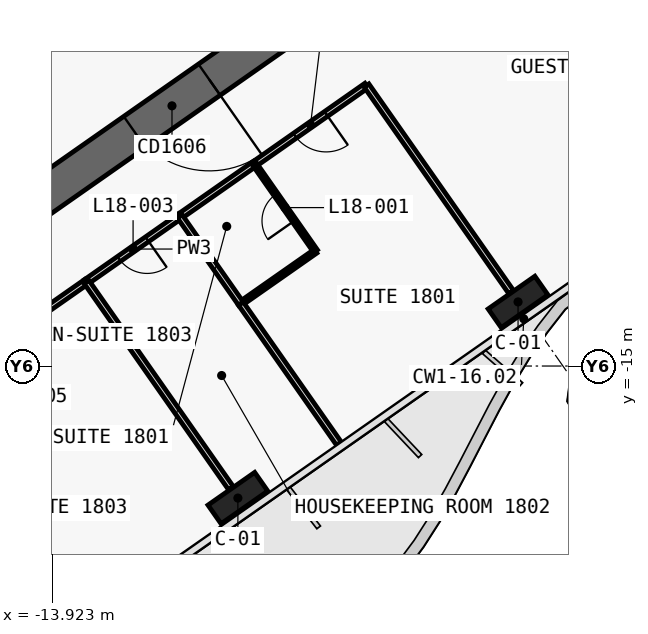
"""IFC4 building model, lengths in metres.
Left out: names, types, materials, properties, quantities, classifications, styles, units other than length and angle.
Written with IfcOpenShell. Run it as: python <this file> out.ifc"""

import sys

from ifc_helpers import new_model, si_unit, direction, frame, frame_2d, origin, origin_2d, place, context, subcontext, project, spatial, polyline, rectangle, outline, extrude, element, fill, save


model = new_model("IFC4")
c1 = context("Model", 3, precision=1e-05, world=origin(), true_north=direction((0.0, 1.0)))
c2 = subcontext(c1, "Body", "Model", "MODEL_VIEW")
j1 = project(units=[si_unit("LENGTHUNIT", "METRE"), si_unit("PLANEANGLEUNIT", "RADIAN")], contexts=[c1])
p1 = place(None, origin())
s1 = spatial("IfcSite", under=j1, at=p1, CompositionType="ELEMENT")
p2 = place(p1, origin())
s2 = spatial("IfcBuilding", under=s1, at=p2, CompositionType="ELEMENT")
p3 = place(p2, frame((0.0, 0.0, 90.5)))
s3 = spatial("IfcBuildingStorey", under=s2, at=p3, CompositionType="ELEMENT", Elevation=90.5)
p4 = place(p3, frame((0.037, 11.867, 0.0), z_axis=(0.0, 0.0, 1.0), x_axis=(-0.819155306259, -0.573571777746, 0.0)))
e1 = element("IfcWall", 1, at=p4, inside=s3, PredefinedType="SHEAR", context=c2, shape_type="SweptSolid", body=[
    extrude(outline(polyline([(33.837, 0.5), (0.7, 0.5), (0.0, -0.5), (33.837, -0.5), (33.837, 0.5)])), origin(), (0.0, 0.0, 1.0), 3.6),
])
p5 = place(p3, frame((0.037, -0.585, 0.0), z_axis=(0.0, 0.0, 1.0), x_axis=(-0.819157152511, -0.573569140985, 0.0)))
e2 = element("IfcWall", 2, at=p5, inside=s3, PredefinedType="SHEAR", context=c2, shape_type="SweptSolid", body=[
    extrude(outline(polyline([(26.695, 0.5), (0.7, 0.5), (0.0, -0.5), (26.695, -0.5), (26.695, 0.5)])), origin(), (0.0, 0.0, 1.0), 3.6),
])
p6 = place(p5, frame((2.995, 0.0, 0.0)))
e3 = element("IfcOpeningElement", 3, at=p6, cuts=e2, PredefinedType="OPENING", context=c2, shape_type="SweptSolid", body=[
    extrude(rectangle(XDim=2.4, YDim=2.1, at=frame_2d((1.2, 1.05))), frame((0.0, 0.51, 0.0), z_axis=(0.0, -1.0, 0.0), x_axis=(1.0, 0.0, 0.0)), (0.0, 0.0, 1.0), 1.02),
])
p7 = place(p5, frame((11.995, 0.0, 0.0)))
e4 = element("IfcOpeningElement", 4, at=p7, cuts=e2, PredefinedType="OPENING", context=c2, shape_type="SweptSolid", body=[
    extrude(rectangle(XDim=2.4, YDim=2.1, at=frame_2d((1.2, 1.05))), frame((0.0, 0.51, 0.0), z_axis=(0.0, -1.0, 0.0), x_axis=(1.0, 0.0, 0.0)), (0.0, 0.0, 1.0), 1.02),
])
p8 = place(p3, frame((-2.638, 3.768, 0.0), z_axis=(0.0, 0.0, 1.0), x_axis=(-0.819148977158, -0.573580816643, 0.0)))
e5 = element("IfcWall", 5, at=p8, inside=s3, PredefinedType="SHEAR", context=c2, shape_type="SweptSolid", body=[
    extrude(outline(polyline([(26.0, 0.25), (0.0, 0.25), (0.0, -0.25), (26.0, -0.25), (26.0, 0.25)])), origin(), (0.0, 0.0, 1.0), 3.6),
])
p9 = place(p8, frame((1.169, 0.0, 0.0)))
e6 = element("IfcOpeningElement", 6, at=p9, cuts=e5, PredefinedType="OPENING", context=c2, shape_type="SweptSolid", body=[
    extrude(rectangle(XDim=1.1, YDim=2.1, at=frame_2d((0.55, 1.05))), frame((0.0, 0.26, 0.0), z_axis=(0.0, -1.0, 0.0), x_axis=(1.0, 0.0, 0.0)), (0.0, 0.0, 1.0), 0.52),
])
p10 = place(p8, frame((3.206, 0.0, 0.0)))
e7 = element("IfcOpeningElement", 7, at=p10, cuts=e5, PredefinedType="OPENING", context=c2, shape_type="SweptSolid", body=[
    extrude(rectangle(XDim=1.1, YDim=2.1, at=frame_2d((0.55, 1.05))), frame((0.0, 0.26, 0.0), z_axis=(0.0, -1.0, 0.0), x_axis=(1.0, 0.0, 0.0)), (0.0, 0.0, 1.0), 0.52),
])
p11 = place(p8, frame((5.244, 0.0, 0.0)))
e8 = element("IfcOpeningElement", 8, at=p11, cuts=e5, PredefinedType="OPENING", context=c2, shape_type="SweptSolid", body=[
    extrude(rectangle(XDim=1.1, YDim=2.1, at=frame_2d((0.55, 1.05))), frame((0.0, 0.26, 0.0), z_axis=(0.0, -1.0, 0.0), x_axis=(1.0, 0.0, 0.0)), (0.0, 0.0, 1.0), 0.52),
])
p12 = place(p8, frame((7.281, 0.0, 0.0)))
e9 = element("IfcOpeningElement", 9, at=p12, cuts=e5, PredefinedType="OPENING", context=c2, shape_type="SweptSolid", body=[
    extrude(rectangle(XDim=1.1, YDim=2.1, at=frame_2d((0.55, 1.05))), frame((0.0, 0.26, 0.0), z_axis=(0.0, -1.0, 0.0), x_axis=(1.0, 0.0, 0.0)), (0.0, 0.0, 1.0), 0.52),
])
p13 = place(p8, frame((9.688, 0.0, 0.0)))
e10 = element("IfcOpeningElement", 10, at=p13, cuts=e5, PredefinedType="OPENING", context=c2, shape_type="SweptSolid", body=[
    extrude(rectangle(XDim=1.1, YDim=2.1, at=frame_2d((0.55, 1.05))), frame((0.0, 0.26, 0.0), z_axis=(0.0, -1.0, 0.0), x_axis=(1.0, 0.0, 0.0)), (0.0, 0.0, 1.0), 0.52),
])
p14 = place(p8, frame((11.863, 0.0, 0.0)))
e11 = element("IfcOpeningElement", 11, at=p14, cuts=e5, PredefinedType="OPENING", context=c2, shape_type="SweptSolid", body=[
    extrude(rectangle(XDim=1.1, YDim=2.1, at=frame_2d((0.55, 1.05))), frame((0.0, 0.26, 0.0), z_axis=(0.0, -1.0, 0.0), x_axis=(1.0, 0.0, 0.0)), (0.0, 0.0, 1.0), 0.52),
])
p15 = place(p8, frame((14.038, 0.0, 0.0)))
e12 = element("IfcOpeningElement", 12, at=p15, cuts=e5, PredefinedType="OPENING", context=c2, shape_type="SweptSolid", body=[
    extrude(rectangle(XDim=1.1, YDim=2.1, at=frame_2d((0.55, 1.05))), frame((0.0, 0.26, 0.0), z_axis=(0.0, -1.0, 0.0), x_axis=(1.0, 0.0, 0.0)), (0.0, 0.0, 1.0), 0.52),
])
p16 = place(p8, frame((16.212, 0.0, 0.0)))
e13 = element("IfcOpeningElement", 13, at=p16, cuts=e5, PredefinedType="OPENING", context=c2, shape_type="SweptSolid", body=[
    extrude(rectangle(XDim=1.1, YDim=2.1, at=frame_2d((0.55, 1.05))), frame((0.0, 0.26, 0.0), z_axis=(0.0, -1.0, 0.0), x_axis=(1.0, 0.0, 0.0)), (0.0, 0.0, 1.0), 0.52),
])
for number, where, z_axis, x_axis in (
    (14, (-1.665, -13.313, 0.0), (0.0, 0.0, 1.0), (-0.819, -0.574, 0.0)),
    (15, (-9.038, -18.475, 0.0), (0.0, 0.0, 1.0), (-0.819, -0.574, 0.0)),
):
    element("IfcColumn", number, at=place(p3, frame(where, z_axis=z_axis, x_axis=x_axis)), inside=s3, PredefinedType="COLUMN", context=c2, shape_type="SweptSolid", body=[
        extrude(rectangle(XDim=1.5, YDim=0.6, at=origin_2d()), origin(), (0.0, 0.0, 1.0), 3.6),
    ])
p17 = place(p3, frame((-5.652, -7.62, 0.0), z_axis=(0.0, 0.0, 1.0), x_axis=(-0.819149096931, -0.573580645591, 0.0)))
e16 = element("IfcWall", 16, at=p17, inside=s3, PredefinedType="PARTITIONING", context=c2, shape_type="SweptSolid", body=[
    extrude(rectangle(XDim=3.601, YDim=0.15, at=frame_2d((1.8, 0.0))), origin(), (0.0, 0.0, 1.0), 2.6),
])
p18 = place(p17, frame((1.3, 0.0, 0.0)))
e17 = element("IfcOpeningElement", 17, at=p18, cuts=e16, PredefinedType="OPENING", context=c2, shape_type="SweptSolid", body=[
    extrude(rectangle(XDim=1.0, YDim=2.1, at=frame_2d((0.5, 1.05))), frame((0.0, 0.085, 0.0), z_axis=(0.0, -1.0, 0.0), x_axis=(1.0, 0.0, 0.0)), (0.0, 0.0, 1.0), 0.17),
])
p19 = place(p3, frame((-8.599, -9.683, 0.0), z_axis=(0.0, 0.0, 1.0), x_axis=(-0.819146032251, -0.573585022335, 0.0)))
e18 = element("IfcWall", 18, at=p19, inside=s3, PredefinedType="PARTITIONING", context=c2, shape_type="SweptSolid", body=[
    extrude(rectangle(XDim=2.404, YDim=0.15, at=frame_2d((1.202, 0.0))), origin(), (0.0, 0.0, 1.0), 3.32),
])
p20 = place(p3, frame((-10.565, -11.06, 0.0), z_axis=(0.0, 0.0, 1.0), x_axis=(-0.81916700466, -0.573555070134, 0.0)))
e19 = element("IfcWall", 19, at=p20, inside=s3, PredefinedType="PARTITIONING", context=c2, shape_type="SweptSolid", body=[
    extrude(rectangle(XDim=3.004, YDim=0.15, at=frame_2d((1.502, 0.0))), origin(), (0.0, 0.0, 1.0), 2.6),
])
p21 = place(p20, frame((1.052, 0.0, 0.0)))
e20 = element("IfcOpeningElement", 20, at=p21, cuts=e19, PredefinedType="OPENING", context=c2, shape_type="SweptSolid", body=[
    extrude(rectangle(XDim=0.9, YDim=2.1, at=frame_2d((0.45, 1.05))), frame((0.0, 0.085, 0.0), z_axis=(0.0, -1.0, 0.0), x_axis=(1.0, 0.0, 0.0)), (0.0, 0.0, 1.0), 0.17),
])
p22 = place(p3, frame((-13.022, -12.781, 0.0), z_axis=(0.0, 0.0, 1.0), x_axis=(-0.819141582452, -0.573591377113, 0.0)))
e21 = element("IfcWall", 21, at=p22, inside=s3, PredefinedType="PARTITIONING", context=c2, shape_type="SweptSolid", body=[
    extrude(rectangle(XDim=6.603, YDim=0.15, at=frame_2d((3.301, 0.0))), origin(), (0.0, 0.0, 1.0), 2.6),
])
p23 = place(p22, frame((2.802, 0.0, 0.0)))
e22 = element("IfcOpeningElement", 22, at=p23, cuts=e21, PredefinedType="OPENING", context=c2, shape_type="SweptSolid", body=[
    extrude(rectangle(XDim=1.0, YDim=2.1, at=frame_2d((0.5, 1.05))), frame((0.0, 0.085, 0.0), z_axis=(0.0, -1.0, 0.0), x_axis=(1.0, 0.0, 0.0)), (0.0, 0.0, 1.0), 0.17),
])
p24 = place(p3, frame((-1.849, -13.051, 0.0), z_axis=(0.0, 0.0, 1.0), x_axis=(-0.573575988258, 0.819152358047, 0.0)))
e23 = element("IfcWall", 23, at=p24, inside=s3, PredefinedType="PARTITIONING", context=c2, shape_type="SweptSolid", body=[
    extrude(rectangle(XDim=6.632, YDim=0.15, at=frame_2d((3.316, 0.0))), origin(), (0.0, 0.0, 1.0), 2.6),
])
p25 = place(p3, frame((-8.96, -13.355, 0.0), z_axis=(0.0, 0.0, 1.0), x_axis=(0.819188907105, 0.573523787192, 0.0)))
e24 = element("IfcWall", 24, at=p25, inside=s3, PredefinedType="PARTITIONING", context=c2, shape_type="SweptSolid", body=[
    extrude(rectangle(XDim=2.4, YDim=0.12, at=frame_2d((1.2, 0.0))), origin(), (0.0, 0.0, 1.0), 3.32),
])
p26 = place(p3, frame((-6.994, -11.978, 0.0), z_axis=(0.0, 0.0, 1.0), x_axis=(-0.573550118428, 0.819170471667, 0.0)))
e25 = element("IfcWall", 25, at=p26, inside=s3, PredefinedType="PARTITIONING", context=c2, shape_type="SweptSolid", body=[
    extrude(rectangle(XDim=2.8, YDim=0.12, at=frame_2d((1.4, 0.0))), origin(), (0.0, 0.0, 1.0), 3.32),
])
p27 = place(p26, frame((0.975, 0.0, 0.0)))
e26 = element("IfcOpeningElement", 26, at=p27, cuts=e25, PredefinedType="OPENING", context=c2, shape_type="SweptSolid", body=[
    extrude(rectangle(XDim=0.85, YDim=2.05, at=frame_2d((0.425, 1.025))), frame((0.0, 0.07, 0.0), z_axis=(0.0, -1.0, 0.0), x_axis=(1.0, 0.0, 0.0)), (0.0, 0.0, 1.0), 0.14),
])
p28 = place(p3, frame((-6.379, -17.041, 0.0), z_axis=(0.0, 0.0, 1.0), x_axis=(-0.573564311442, 0.819160534108, 0.0)))
e27 = element("IfcWall", 27, at=p28, inside=s3, PredefinedType="PARTITIONING", context=c2, shape_type="SweptSolid", body=[
    extrude(rectangle(XDim=4.499, YDim=0.15, at=frame_2d((2.25, 0.0))), origin(), (0.0, 0.0, 1.0), 2.5),
])
p29 = place(p3, frame((-8.96, -13.355, 0.0), z_axis=(0.0, 0.0, 1.0), x_axis=(-0.573608623498, 0.819129505664, 0.0)))
e28 = element("IfcWall", 28, at=p29, inside=s3, PredefinedType="PARTITIONING", context=c2, shape_type="SweptSolid", body=[
    extrude(rectangle(XDim=2.8, YDim=0.15, at=frame_2d((1.4, 0.0))), origin(), (0.0, 0.0, 1.0), 3.32),
])
p30 = place(p3, frame((-9.221, -18.213, 0.0), z_axis=(0.0, 0.0, 1.0), x_axis=(-0.573556251799, 0.819166177294, 0.0)))
e29 = element("IfcWall", 29, at=p30, inside=s3, PredefinedType="PARTITIONING", context=c2, shape_type="SweptSolid", body=[
    extrude(rectangle(XDim=6.63, YDim=0.15, at=frame_2d((3.315, 0.0))), origin(), (0.0, 0.0, 1.0), 2.6),
])
p31 = place(p7, origin())
e30 = element("IfcDoor", 30, at=p31, inside=s3, OperationType="DOUBLE_DOOR_SINGLE_SWING", PredefinedType="DOOR", context=c2, shape_type="SweptSolid", body=[
    extrude(rectangle(XDim=2.4, YDim=2.1, at=frame_2d((1.2, 1.05))), frame((0.0, 0.025, 0.0), z_axis=(0.0, -1.0, 0.0), x_axis=(1.0, 0.0, 0.0)), (0.0, 0.0, 1.0), 0.05),
])
fill(e4, e30)
p32 = place(p27, origin())
e31 = element("IfcDoor", 31, at=p32, inside=s3, OperationType="SINGLE_SWING_LEFT", PredefinedType="DOOR", context=c2, shape_type="SweptSolid", body=[
    extrude(rectangle(XDim=0.85, YDim=2.05, at=frame_2d((0.425, 1.025))), frame((0.0, 0.025, 0.0), z_axis=(0.0, -1.0, 0.0), x_axis=(1.0, 0.0, 0.0)), (0.0, 0.0, 1.0), 0.05),
])
fill(e26, e31)
p33 = place(p18, origin())
e32 = element("IfcDoor", 32, at=p33, inside=s3, OperationType="SINGLE_SWING_RIGHT", PredefinedType="DOOR", context=c2, shape_type="SweptSolid", body=[
    extrude(rectangle(XDim=1.0, YDim=2.1, at=frame_2d((0.5, 1.05))), frame((0.0, 0.025, 0.0), z_axis=(0.0, -1.0, 0.0), x_axis=(1.0, 0.0, 0.0)), (0.0, 0.0, 1.0), 0.05),
])
fill(e17, e32)
p34 = place(p21, origin())
e33 = element("IfcDoor", 33, at=p34, inside=s3, OperationType="SINGLE_SWING_RIGHT", PredefinedType="DOOR", context=c2, shape_type="SweptSolid", body=[
    extrude(rectangle(XDim=0.9, YDim=2.1, at=frame_2d((0.45, 1.05))), frame((0.0, 0.025, 0.0), z_axis=(0.0, -1.0, 0.0), x_axis=(1.0, 0.0, 0.0)), (0.0, 0.0, 1.0), 0.05),
])
fill(e20, e33)
save(model, sys.argv[1])
